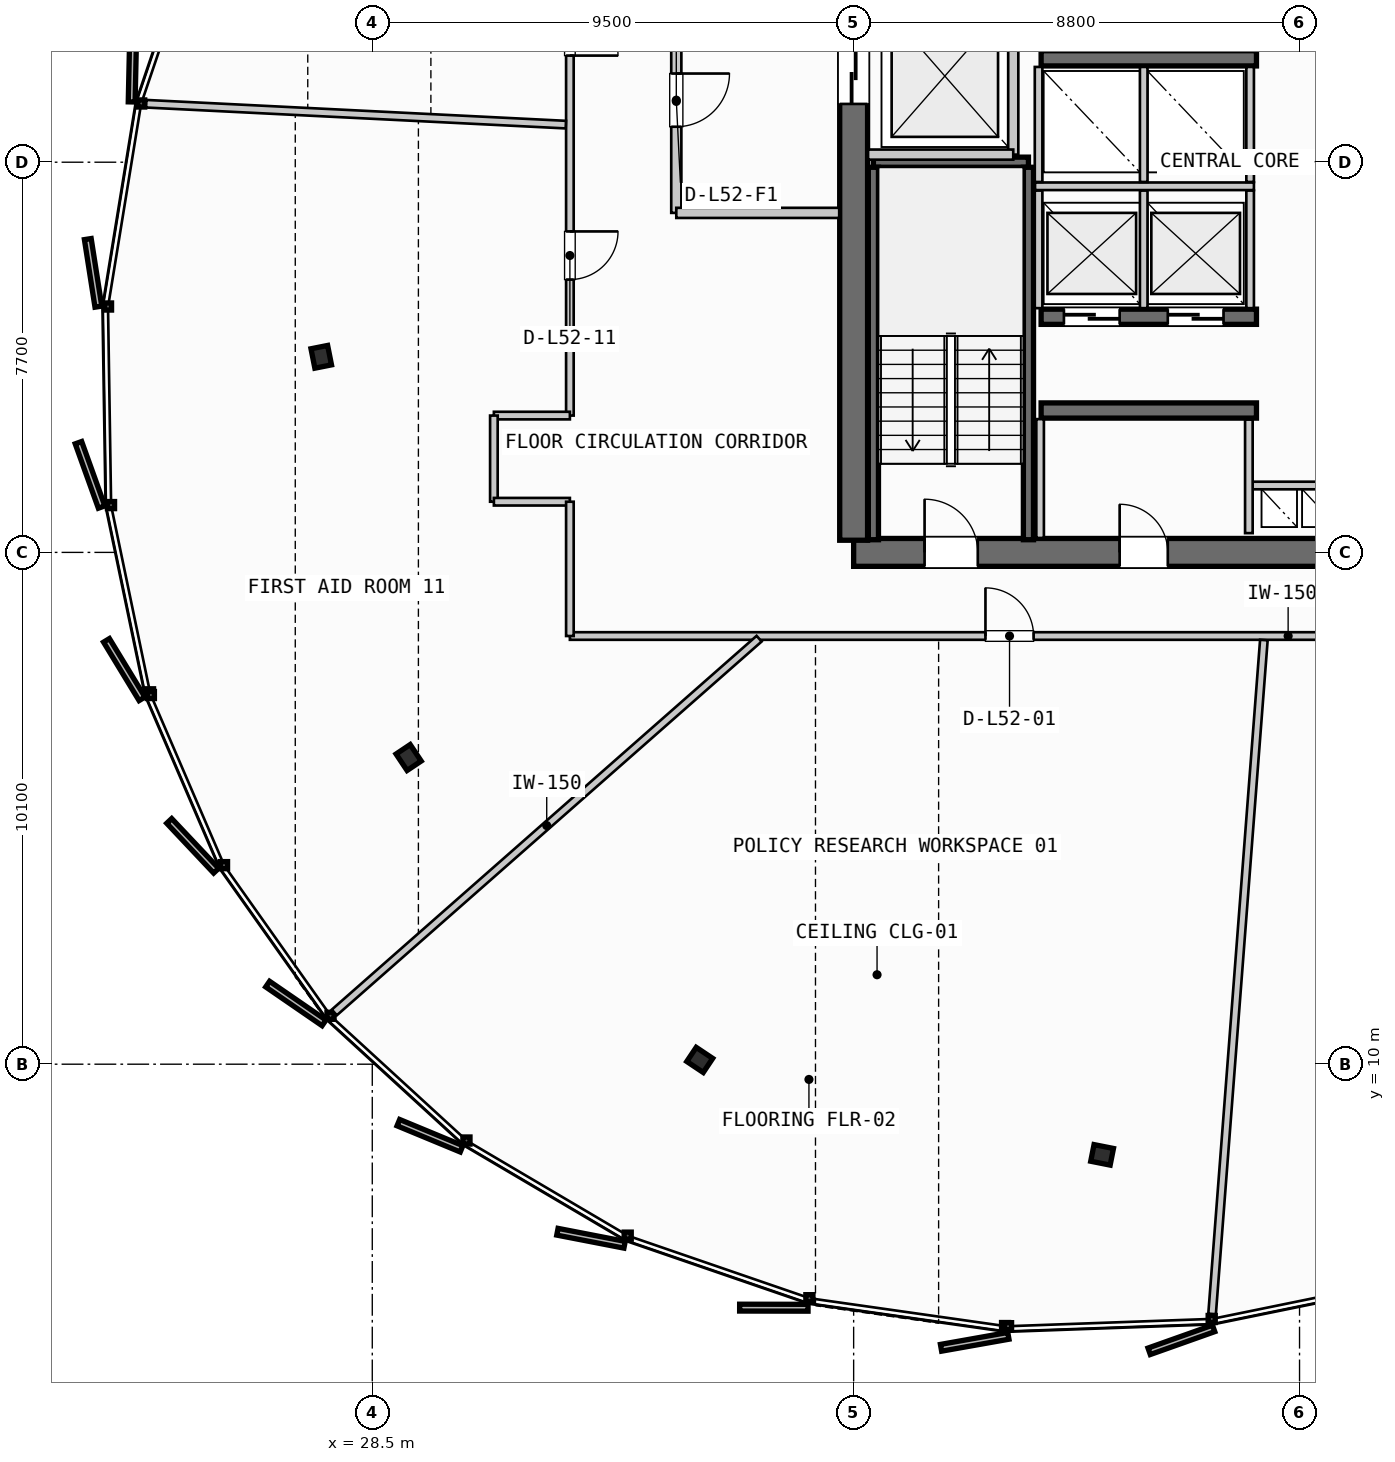
"""IFC4 building model, lengths in metres.
Left out: names, types, materials, properties, quantities, classifications, styles, units other than length and angle.
Written with IfcOpenShell. Run it as: python <this file> out.ifc"""

import sys

from ifc_helpers import new_model, si_unit, direction, frame, frame_2d, origin, origin_2d, place, context, subcontext, project, spatial, rectangle, i_section, extrude, source, transform, mapped, element, fill, save


model = new_model("IFC4")
c1 = context("Model", 3, precision=1e-05, world=origin(), true_north=direction((0.0, 1.0)))
c2 = subcontext(c1, "Body", "Model", "MODEL_VIEW")
j1 = project(units=[si_unit("LENGTHUNIT", "METRE"), si_unit("PLANEANGLEUNIT", "RADIAN")], contexts=[c1])
p1 = place(None, origin())
s1 = spatial("IfcSite", under=j1, at=p1, CompositionType="ELEMENT")
p2 = place(p1, origin())
s2 = spatial("IfcBuilding", under=s1, at=p2, CompositionType="ELEMENT")
p3 = place(p2, frame((0.0, 0.0, 200.9)))
s3 = spatial("IfcBuildingStorey", under=s2, at=p3, CompositionType="ELEMENT", Elevation=200.9)
p4 = place(p3, frame((38.0, 20.1, 0.0), z_axis=(0.0, 0.0, 1.0), x_axis=(1.0, 0.0, 0.0)))
e1 = element("IfcWall", 1, at=p4, inside=s3, PredefinedType="SHEAR", context=c2, shape_type="SweptSolid", body=[
    extrude(rectangle(XDim=17.6, YDim=0.55, at=frame_2d((8.8, 0.0))), origin(), (0.0, 0.0, 1.0), 3.26),
])
p5 = place(p4, frame((1.4, 0.0, 0.0)))
e2 = element("IfcOpeningElement", 2, at=p5, cuts=e1, PredefinedType="OPENING", context=c2, shape_type="SweptSolid", body=[
    extrude(rectangle(XDim=1.05, YDim=2.15, at=frame_2d((0.525, 1.075))), frame((0.0, 0.285, 0.0), z_axis=(0.0, -1.0, 0.0), x_axis=(1.0, 0.0, 0.0)), (0.0, 0.0, 1.0), 0.57),
])
p6 = place(p4, frame((15.15, 0.0, 0.0)))
e3 = element("IfcOpeningElement", 3, at=p6, cuts=e1, PredefinedType="OPENING", context=c2, shape_type="SweptSolid", body=[
    extrude(rectangle(XDim=1.05, YDim=2.15, at=frame_2d((0.525, 1.075))), frame((0.0, 0.285, 0.0), z_axis=(0.0, -1.0, 0.0), x_axis=(1.0, 0.0, 0.0)), (0.0, 0.0, 1.0), 0.57),
])
p7 = place(p4, frame((5.25, 0.0, 0.0)))
e4 = element("IfcOpeningElement", 4, at=p7, cuts=e1, PredefinedType="OPENING", context=c2, shape_type="SweptSolid", body=[
    extrude(rectangle(XDim=0.95, YDim=2.15, at=frame_2d((0.475, 1.075))), frame((0.0, 0.285, 0.0), z_axis=(0.0, -1.0, 0.0), x_axis=(1.0, 0.0, 0.0)), (0.0, 0.0, 1.0), 0.57),
])
p8 = place(p4, frame((11.4, 0.0, 0.0)))
e5 = element("IfcOpeningElement", 5, at=p8, cuts=e1, PredefinedType="OPENING", context=c2, shape_type="SweptSolid", body=[
    extrude(rectangle(XDim=0.95, YDim=2.15, at=frame_2d((0.475, 1.075))), frame((0.0, 0.285, 0.0), z_axis=(0.0, -1.0, 0.0), x_axis=(1.0, 0.0, 0.0)), (0.0, 0.0, 1.0), 0.57),
])
p9 = place(p3, frame((38.0, 35.26, 0.0), z_axis=(0.0, 0.0, 1.0), x_axis=(0.0, -1.0, 0.0)))
e6 = element("IfcWall", 6, at=p9, inside=s3, PredefinedType="SHEAR", context=c2, shape_type="SweptSolid", body=[
    extrude(rectangle(XDim=14.92, YDim=0.55, at=frame_2d((7.46, 0.0))), origin(), (0.0, 0.0, 1.0), 3.26),
])
p10 = place(p9, frame((5.21, 0.0, 0.0)))
e7 = element("IfcOpeningElement", 7, at=p10, cuts=e6, PredefinedType="OPENING", context=c2, shape_type="SweptSolid", body=[
    extrude(rectangle(XDim=1.1, YDim=2.2, at=frame_2d((0.55, 1.1))), frame((0.0, 0.285, 0.0), z_axis=(0.0, -1.0, 0.0), x_axis=(1.0, 0.0, 0.0)), (0.0, 0.0, 1.0), 0.57),
])
p11 = place(p3, frame((41.7, 22.9, 0.0), z_axis=(0.0, 0.0, 1.0), x_axis=(1.0, 0.0, 0.0)))
e8 = element("IfcWall", 8, at=p11, inside=s3, PredefinedType="SHEAR", context=c2, shape_type="SweptSolid", body=[
    extrude(rectangle(XDim=4.25, YDim=0.3, at=frame_2d((2.125, 0.0))), origin(), (0.0, 0.0, 1.0), 3.26),
])
p12 = place(p3, frame((41.7, 24.75, 0.0), z_axis=(0.0, 0.0, 1.0), x_axis=(1.0, 0.0, 0.0)))
e9 = element("IfcWall", 9, at=p12, inside=s3, PredefinedType="SHEAR", context=c2, shape_type="SweptSolid", body=[
    extrude(rectangle(XDim=4.25, YDim=0.3, at=frame_2d((2.125, 0.0))), origin(), (0.0, 0.0, 1.0), 3.26),
])
p13 = place(p12, frame((0.45, 0.0, 0.0)))
e10 = element("IfcOpeningElement", 10, at=p13, cuts=e9, PredefinedType="OPENING", context=c2, shape_type="SweptSolid", body=[
    extrude(rectangle(XDim=1.1, YDim=2.2, at=frame_2d((0.55, 1.1))), frame((0.0, 0.16, 0.0), z_axis=(0.0, -1.0, 0.0), x_axis=(1.0, 0.0, 0.0)), (0.0, 0.0, 1.0), 0.32),
])
p14 = place(p12, frame((2.5, 0.0, 0.0)))
e11 = element("IfcOpeningElement", 11, at=p14, cuts=e9, PredefinedType="OPENING", context=c2, shape_type="SweptSolid", body=[
    extrude(rectangle(XDim=1.1, YDim=2.2, at=frame_2d((0.55, 1.1))), frame((0.0, 0.16, 0.0), z_axis=(0.0, -1.0, 0.0), x_axis=(1.0, 0.0, 0.0)), (0.0, 0.0, 1.0), 0.32),
])
p15 = place(p3, frame((41.7, 29.85, 0.0), z_axis=(0.0, 0.0, 1.0), x_axis=(1.0, 0.0, 0.0)))
e12 = element("IfcWall", 12, at=p15, inside=s3, PredefinedType="SHEAR", context=c2, shape_type="SweptSolid", body=[
    extrude(rectangle(XDim=4.25, YDim=0.3, at=frame_2d((2.125, 0.0))), origin(), (0.0, 0.0, 1.0), 3.26),
])
m1 = source(origin(), c2, "Body", "SweptSolid", [
    extrude(i_section(OverallWidth=0.391, OverallDepth=0.335, WebThickness=0.023, FlangeThickness=0.034, FilletRadius=0.015, at=origin_2d()), origin(), (0.0, 0.0, 1.0), 3.26),
])
for number, where, z_axis, x_axis in (
    (13, (27.493, 23.96, 0.0), (0.0, 0.0, 1.0), (-0.981, -0.195, 0.0)),
    (14, (29.218, 16.052, 0.0), (0.0, 0.0, 1.0), (-0.831, -0.556, 0.0)),
    (15, (34.963, 10.084, 0.0), (0.0, 0.0, 1.0), (-0.556, -0.831, 0.0)),
    (16, (42.904, 8.211, 0.0), (0.0, 0.0, 1.0), (-0.195, -0.981, 0.0)),
):
    element("IfcColumn", number, at=place(p3, frame(where, z_axis=z_axis, x_axis=x_axis)), inside=s3, PredefinedType="COLUMN", context=c2, shape_type="MappedRepresentation", body=[
        mapped(m1, transform((0.0, 0.0, 0.0), scale=1.0)),
    ])
p16 = place(p3, frame((38.39, 27.8, 0.0), z_axis=(0.0, 0.0, 1.0), x_axis=(1.0, 0.0, 0.0)))
e17 = element("IfcWall", 17, at=p16, inside=s3, PredefinedType="SHEAR", context=c2, shape_type="SweptSolid", body=[
    extrude(rectangle(XDim=3.06, YDim=0.2, at=frame_2d((1.53, 0.0))), origin(), (0.0, 0.0, 1.0), 3.26),
])
for number, where, z_axis, x_axis in (
    (18, (41.45, 27.7, 0.0), (0.0, 0.0, 1.0), (0.0, -1.0, 0.0)),
    (19, (38.39, 20.35, 0.0), (0.0, 0.0, 1.0), (0.0, 1.0, 0.0)),
):
    element("IfcWall", number, at=place(p3, frame(where, z_axis=z_axis, x_axis=x_axis)), inside=s3, PredefinedType="SHEAR", context=c2, shape_type="SweptSolid", body=[
        extrude(rectangle(XDim=7.35, YDim=0.2, at=frame_2d((3.675, 0.0))), origin(), (0.0, 0.0, 1.0), 3.26),
    ])
p17 = place(p3, frame((45.8, 21.42, 0.0), z_axis=(0.0, 0.0, 1.0), x_axis=(1.0, 0.0, 0.0)))
e20 = element("IfcWall", 20, at=p17, inside=s3, PredefinedType="PARTITIONING", context=c2, shape_type="SweptSolid", body=[
    extrude(rectangle(XDim=2.0, YDim=0.15, at=frame_2d((1.0, 0.0))), origin(), (0.0, 0.0, 1.0), 2.595),
])
p18 = place(p3, frame((45.8, 20.48, 0.0), z_axis=(0.0, 0.0, 1.0), x_axis=(0.0, 1.0, 0.0)))
e21 = element("IfcWall", 21, at=p18, inside=s3, PredefinedType="PARTITIONING", context=c2, shape_type="SweptSolid", body=[
    extrude(rectangle(XDim=2.24, YDim=0.15, at=frame_2d((1.12, 0.0))), origin(), (0.0, 0.0, 1.0), 2.595),
])
p19 = place(p3, frame((41.15, 27.95, 0.0), z_axis=(0.0, 0.0, 1.0), x_axis=(0.0, 1.0, 0.0)))
e22 = element("IfcWall", 22, at=p19, inside=s3, PredefinedType="PARTITIONING", context=c2, shape_type="SweptSolid", body=[
    extrude(rectangle(XDim=3.1, YDim=0.2, at=frame_2d((1.55, 0.0))), origin(), (0.0, 0.0, 1.0), 2.595),
])
p20 = place(p3, frame((38.285, 27.95, 0.0), z_axis=(0.0, 0.0, 1.0), x_axis=(1.0, 0.0, 0.0)))
e23 = element("IfcWall", 23, at=p20, inside=s3, PredefinedType="PARTITIONING", context=c2, shape_type="SweptSolid", body=[
    extrude(rectangle(XDim=2.865, YDim=0.2, at=frame_2d((1.433, 0.0))), origin(), (0.0, 0.0, 1.0), 2.595),
])
p21 = place(p3, frame((34.5, 31.2, 0.0), z_axis=(0.0, 0.0, 1.0), x_axis=(0.0, -1.0, 0.0)))
e24 = element("IfcWall", 24, at=p21, inside=s3, PredefinedType="PARTITIONING", context=c2, shape_type="SweptSolid", body=[
    extrude(rectangle(XDim=4.4, YDim=0.2, at=frame_2d((2.2, 0.0))), origin(), (0.0, 0.0, 1.0), 2.595),
])
p22 = place(p21, frame((1.65, 0.0, 0.0)))
e25 = element("IfcOpeningElement", 25, at=p22, cuts=e24, PredefinedType="OPENING", context=c2, shape_type="SweptSolid", body=[
    extrude(rectangle(XDim=1.05, YDim=2.15, at=frame_2d((0.525, 1.075))), frame((0.0, 0.11, 0.0), z_axis=(0.0, -1.0, 0.0), x_axis=(1.0, 0.0, 0.0)), (0.0, 0.0, 1.0), 0.22),
])
p23 = place(p3, frame((34.5, 26.8, 0.0), z_axis=(0.0, 0.0, 1.0), x_axis=(1.0, 0.0, 0.0)))
e26 = element("IfcWall", 26, at=p23, inside=s3, PredefinedType="PARTITIONING", context=c2, shape_type="SweptSolid", body=[
    extrude(rectangle(XDim=3.215, YDim=0.2, at=frame_2d((1.607, 0.0))), origin(), (0.0, 0.0, 1.0), 2.595),
])
p24 = place(p3, frame((41.68, 20.385, 0.0), z_axis=(0.0, 0.0, 1.0), x_axis=(0.0, 1.0, 0.0)))
e27 = element("IfcWall", 27, at=p24, inside=s3, PredefinedType="PARTITIONING", context=c2, shape_type="SweptSolid", body=[
    extrude(rectangle(XDim=2.345, YDim=0.15, at=frame_2d((1.172, 0.0))), origin(), (0.0, 0.0, 1.0), 2.595),
])
p25 = place(p3, frame((41.58, 27.325, 0.0), z_axis=(0.0, 0.0, 1.0), x_axis=(1.0, 0.0, 0.0)))
e28 = element("IfcWall", 28, at=p25, inside=s3, PredefinedType="PARTITIONING", context=c2, shape_type="SweptSolid", body=[
    extrude(rectangle(XDim=4.32, YDim=0.15, at=frame_2d((2.16, 0.0))), origin(), (0.0, 0.0, 1.0), 2.595),
])
for number, where, z_axis, x_axis in (
    (29, (41.65, 24.92, 0.0), (0.0, 0.0, 1.0), (0.0, 1.0, 0.0)),
    (30, (43.725, 24.92, 0.0), (0.0, 0.0, 1.0), (0.0, 1.0, 0.0)),
    (31, (45.825, 24.92, 0.0), (0.0, 0.0, 1.0), (0.0, 1.0, 0.0)),
):
    element("IfcWall", number, at=place(p3, frame(where, z_axis=z_axis, x_axis=x_axis)), inside=s3, PredefinedType="PARTITIONING", context=c2, shape_type="SweptSolid", body=[
        extrude(rectangle(XDim=2.32, YDim=0.15, at=frame_2d((1.16, 0.0))), origin(), (0.0, 0.0, 1.0), 2.595),
    ])
for number, where, z_axis, x_axis in (
    (32, (41.65, 27.41, 0.0), (0.0, 0.0, 1.0), (0.0, 1.0, 0.0)),
    (33, (43.725, 27.41, 0.0), (0.0, 0.0, 1.0), (0.0, 1.0, 0.0)),
    (34, (45.825, 27.41, 0.0), (0.0, 0.0, 1.0), (0.0, 1.0, 0.0)),
):
    element("IfcWall", number, at=place(p3, frame(where, z_axis=z_axis, x_axis=x_axis)), inside=s3, PredefinedType="PARTITIONING", context=c2, shape_type="SweptSolid", body=[
        extrude(rectangle(XDim=2.27, YDim=0.15, at=frame_2d((1.135, 0.0))), origin(), (0.0, 0.0, 1.0), 2.595),
    ])
p26 = place(p3, frame((32.4, 18.45, 0.0), z_axis=(0.0, 0.0, 1.0), x_axis=(1.0, 0.0, 0.0)))
e35 = element("IfcWall", 35, at=p26, inside=s3, PredefinedType="PARTITIONING", context=c2, shape_type="SweptSolid", body=[
    extrude(rectangle(XDim=28.35, YDim=0.15, at=frame_2d((14.175, 0.0))), origin(), (0.0, 0.0, 1.0), 2.595),
])
p27 = place(p26, frame((8.202, 0.0, 0.0)))
e36 = element("IfcOpeningElement", 36, at=p27, cuts=e35, PredefinedType="OPENING", context=c2, shape_type="SweptSolid", body=[
    extrude(rectangle(XDim=0.95, YDim=2.15, at=frame_2d((0.475, 1.075))), frame((0.0, 0.085, 0.0), z_axis=(0.0, -1.0, 0.0), x_axis=(1.0, 0.0, 0.0)), (0.0, 0.0, 1.0), 0.17),
])
p28 = place(p26, frame((20.261, 0.0, 0.0)))
e37 = element("IfcOpeningElement", 37, at=p28, cuts=e35, PredefinedType="OPENING", context=c2, shape_type="SweptSolid", body=[
    extrude(rectangle(XDim=0.95, YDim=2.15, at=frame_2d((0.475, 1.075))), frame((0.0, 0.085, 0.0), z_axis=(0.0, -1.0, 0.0), x_axis=(1.0, 0.0, 0.0)), (0.0, 0.0, 1.0), 0.17),
])
p29 = place(p3, frame((32.4, 32.8, 0.0), z_axis=(0.0, 0.0, 1.0), x_axis=(0.0, -1.0, 0.0)))
e38 = element("IfcWall", 38, at=p29, inside=s3, PredefinedType="PARTITIONING", context=c2, shape_type="SweptSolid", body=[
    extrude(rectangle(XDim=10.0, YDim=0.15, at=frame_2d((5.0, 0.0))), origin(), (0.0, 0.0, 1.0), 2.595),
])
p30 = place(p29, frame((1.946, 0.0, 0.0)))
e39 = element("IfcOpeningElement", 39, at=p30, cuts=e38, PredefinedType="OPENING", context=c2, shape_type="SweptSolid", body=[
    extrude(rectangle(XDim=0.95, YDim=2.15, at=frame_2d((0.475, 1.075))), frame((0.0, 0.085, 0.0), z_axis=(0.0, -1.0, 0.0), x_axis=(1.0, 0.0, 0.0)), (0.0, 0.0, 1.0), 0.17),
])
p31 = place(p29, frame((6.366, 0.0, 0.0)))
e40 = element("IfcOpeningElement", 40, at=p31, cuts=e38, PredefinedType="OPENING", context=c2, shape_type="SweptSolid", body=[
    extrude(rectangle(XDim=0.95, YDim=2.15, at=frame_2d((0.475, 1.075))), frame((0.0, 0.085, 0.0), z_axis=(0.0, -1.0, 0.0), x_axis=(1.0, 0.0, 0.0)), (0.0, 0.0, 1.0), 0.17),
])
p32 = place(p3, frame((32.4, 22.8, 0.0), z_axis=(0.0, 0.0, 1.0), x_axis=(-1.0, 0.0, 0.0)))
e41 = element("IfcWall", 41, at=p32, inside=s3, PredefinedType="PARTITIONING", context=c2, shape_type="SweptSolid", body=[
    extrude(rectangle(XDim=1.5, YDim=0.15, at=frame_2d((0.75, 0.0))), origin(), (0.0, 0.0, 1.0), 2.595),
])
p33 = place(p3, frame((30.9, 22.8, 0.0), z_axis=(0.0, 0.0, 1.0), x_axis=(0.0, -1.0, 0.0)))
e42 = element("IfcWall", 42, at=p33, inside=s3, PredefinedType="PARTITIONING", context=c2, shape_type="SweptSolid", body=[
    extrude(rectangle(XDim=1.7, YDim=0.15, at=frame_2d((0.85, 0.0))), origin(), (0.0, 0.0, 1.0), 2.595),
])
p34 = place(p3, frame((30.9, 21.1, 0.0), z_axis=(0.0, 0.0, 1.0), x_axis=(1.0, 0.0, 0.0)))
e43 = element("IfcWall", 43, at=p34, inside=s3, PredefinedType="PARTITIONING", context=c2, shape_type="SweptSolid", body=[
    extrude(rectangle(XDim=1.5, YDim=0.15, at=frame_2d((0.75, 0.0))), origin(), (0.0, 0.0, 1.0), 2.595),
])
p35 = place(p3, frame((32.4, 21.1, 0.0), z_axis=(0.0, 0.0, 1.0), x_axis=(0.0, -1.0, 0.0)))
e44 = element("IfcWall", 44, at=p35, inside=s3, PredefinedType="PARTITIONING", context=c2, shape_type="SweptSolid", body=[
    extrude(rectangle(XDim=2.65, YDim=0.15, at=frame_2d((1.325, 0.0))), origin(), (0.0, 0.0, 1.0), 2.595),
])
p36 = place(p3, frame((36.135, 18.397, 0.0), z_axis=(0.0, 0.0, 1.0), x_axis=(-0.750783345077, -0.66054853626, 0.0)))
e45 = element("IfcWall", 45, at=p36, inside=s3, PredefinedType="PARTITIONING", context=c2, shape_type="SweptSolid", body=[
    extrude(rectangle(XDim=11.166, YDim=0.15, at=frame_2d((5.583, 0.0))), origin(), (0.0, 0.0, 1.0), 2.595),
])
p37 = place(p3, frame((46.096, 18.37, 0.0), z_axis=(0.0, 0.0, 1.0), x_axis=(-0.076623710355, -0.997060081947, 0.0)))
e46 = element("IfcWall", 46, at=p37, inside=s3, PredefinedType="PARTITIONING", context=c2, shape_type="SweptSolid", body=[
    extrude(rectangle(XDim=13.338, YDim=0.15, at=frame_2d((6.669, 0.0))), origin(), (0.0, 0.0, 1.0), 2.595),
])
p38 = place(p3, frame((32.32, 28.542, 0.0), z_axis=(0.0, 0.0, 1.0), x_axis=(-0.998762524817, 0.049733479891, 0.0)))
e47 = element("IfcWall", 47, at=p38, inside=s3, PredefinedType="PARTITIONING", context=c2, shape_type="SweptSolid", body=[
    extrude(rectangle(XDim=8.291, YDim=0.15, at=frame_2d((4.146, 0.0))), origin(), (0.0, 0.0, 1.0), 2.595),
])
m2 = source(origin(), c2, "Body", "SweptSolid", [
    extrude(rectangle(XDim=1.05, YDim=2.15, at=frame_2d((0.525, 1.075))), frame((0.0, 0.025, 0.0), z_axis=(0.0, -1.0, 0.0), x_axis=(1.0, 0.0, 0.0)), (0.0, 0.0, 1.0), 0.05),
])
p39 = place(p5, origin())
e48 = element("IfcDoor", 48, at=p39, inside=s3, OperationType="SINGLE_SWING_LEFT", PredefinedType="DOOR", context=c2, shape_type="MappedRepresentation", body=[
    mapped(m2, transform((0.0, 0.0, 0.0), scale=1.0)),
])
fill(e2, e48)
m3 = source(origin(), c2, "Body", "SweptSolid", [
    extrude(rectangle(XDim=1.1, YDim=2.2, at=frame_2d((0.55, 1.1))), frame((0.0, 0.025, 0.0), z_axis=(0.0, -1.0, 0.0), x_axis=(1.0, 0.0, 0.0)), (0.0, 0.0, 1.0), 0.05),
])
p40 = place(p10, origin())
e49 = element("IfcDoor", 49, at=p40, inside=s3, OperationType="SLIDING_TO_LEFT", PredefinedType="DOOR", context=c2, shape_type="MappedRepresentation", body=[
    mapped(m3, transform((0.0, 0.0, 0.0), scale=1.0)),
])
fill(e7, e49)
m4 = source(origin(), c2, "Body", "SweptSolid", [
    extrude(rectangle(XDim=0.95, YDim=2.15, at=frame_2d((0.475, 1.075))), frame((0.0, 0.025, 0.0), z_axis=(0.0, -1.0, 0.0), x_axis=(1.0, 0.0, 0.0)), (0.0, 0.0, 1.0), 0.05),
])
p41 = place(p7, origin())
e50 = element("IfcDoor", 50, at=p41, inside=s3, OperationType="SINGLE_SWING_LEFT", PredefinedType="DOOR", context=c2, shape_type="MappedRepresentation", body=[
    mapped(m4, transform((0.0, 0.0, 0.0), scale=1.0)),
])
fill(e4, e50)
p42 = place(p13, origin())
e51 = element("IfcDoor", 51, at=p42, inside=s3, OperationType="SLIDING_TO_RIGHT", PredefinedType="DOOR", context=c2, shape_type="MappedRepresentation", body=[
    mapped(m3, transform((0.0, 0.0, 0.0), scale=1.0)),
])
fill(e10, e51)
p43 = place(p14, origin())
e52 = element("IfcDoor", 52, at=p43, inside=s3, OperationType="SLIDING_TO_RIGHT", PredefinedType="DOOR", context=c2, shape_type="MappedRepresentation", body=[
    mapped(m3, transform((0.0, 0.0, 0.0), scale=1.0)),
])
fill(e11, e52)
p44 = place(p22, origin())
e53 = element("IfcDoor", 53, at=p44, inside=s3, OperationType="SINGLE_SWING_LEFT", PredefinedType="DOOR", context=c2, shape_type="MappedRepresentation", body=[
    mapped(m2, transform((0.0, 0.0, 0.0), scale=1.0)),
])
fill(e25, e53)
p45 = place(p27, origin())
e54 = element("IfcDoor", 54, at=p45, inside=s3, OperationType="SINGLE_SWING_LEFT", PredefinedType="DOOR", context=c2, shape_type="MappedRepresentation", body=[
    mapped(m4, transform((0.0, 0.0, 0.0), scale=1.0)),
])
fill(e36, e54)
p46 = place(p30, origin())
e55 = element("IfcDoor", 55, at=p46, inside=s3, OperationType="SINGLE_SWING_RIGHT", PredefinedType="DOOR", context=c2, shape_type="MappedRepresentation", body=[
    mapped(m4, transform((0.0, 0.0, 0.0), scale=1.0)),
])
fill(e39, e55)
p47 = place(p31, origin())
e56 = element("IfcDoor", 56, at=p47, inside=s3, OperationType="SINGLE_SWING_LEFT", PredefinedType="DOOR", context=c2, shape_type="MappedRepresentation", body=[
    mapped(m4, transform((0.0, 0.0, 0.0), scale=1.0)),
])
fill(e40, e56)
save(model, sys.argv[1])
